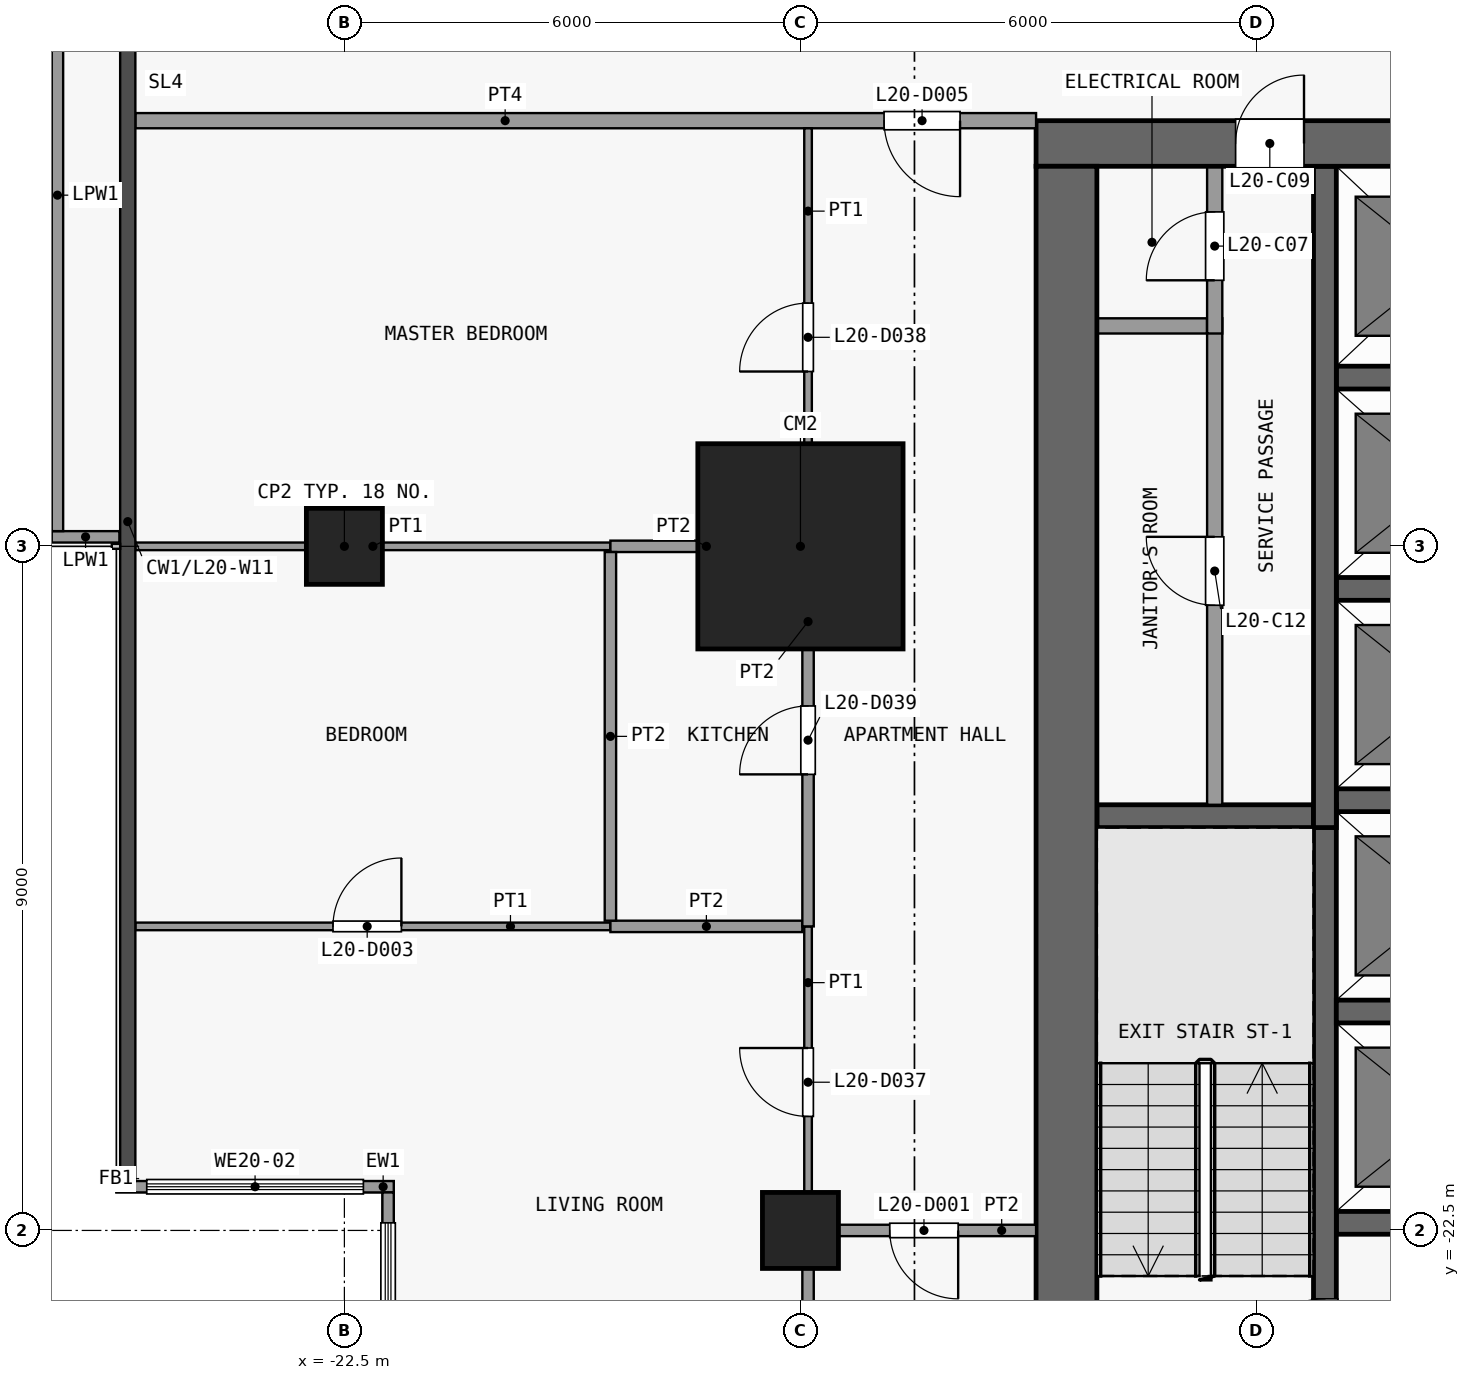
"""IFC4 building model, lengths in metres.
Left out: names, types, materials, properties, quantities, classifications, styles, units other than length and angle.
Written with IfcOpenShell. Run it as: python <this file> out.ifc"""

import sys

from ifc_helpers import new_model, si_unit, direction, frame, frame_2d, origin, origin_2d, place, context, subcontext, project, spatial, rectangle, extrude, element, fill, save


model = new_model("IFC4")
c1 = context("Model", 3, precision=1e-05, world=origin(), true_north=direction((0.0, 1.0)))
c2 = subcontext(c1, "Body", "Model", "MODEL_VIEW")
j1 = project(units=[si_unit("LENGTHUNIT", "METRE"), si_unit("PLANEANGLEUNIT", "RADIAN")], contexts=[c1])
p1 = place(None, origin())
s1 = spatial("IfcSite", under=j1, at=p1, CompositionType="ELEMENT")
p2 = place(p1, origin())
s2 = spatial("IfcBuilding", under=s1, at=p2, CompositionType="ELEMENT")
p3 = place(p2, frame((0.0, 0.0, 84.7)))
s3 = spatial("IfcBuildingStorey", under=s2, at=p3, CompositionType="ELEMENT", Elevation=84.7)
for number, where, z_axis, x_axis in (
    (1, (-22.5, -13.5, 0.0), (0.0, 0.0, 1.0), (1.0, 0.0, 0.0)),
    (2, (-16.5, -22.5, 0.0), (0.0, 0.0, 1.0), (1.0, 0.0, 0.0)),
):
    element("IfcColumn", number, at=place(p3, frame(where, z_axis=z_axis, x_axis=x_axis)), inside=s3, PredefinedType="COLUMN", context=c2, shape_type="SweptSolid", body=[
        extrude(rectangle(XDim=1.0, YDim=1.0, at=origin_2d()), origin(), (0.0, 0.0, 1.0), 3.6),
    ])
p4 = place(p3, frame((-16.5, -13.5, 0.0), z_axis=(0.0, 0.0, 1.0), x_axis=(1.0, 0.0, 0.0)))
e3 = element("IfcColumn", 3, at=p4, inside=s3, PredefinedType="COLUMN", context=c2, shape_type="SweptSolid", body=[
    extrude(rectangle(XDim=2.7, YDim=2.7, at=origin_2d()), origin(), (0.0, 0.0, 1.0), 3.6),
])
p5 = place(p3, frame((-13.4, -8.2, 0.0), z_axis=(0.0, 0.0, 1.0), x_axis=(1.0, 0.0, 0.0)))
e4 = element("IfcWall", 4, at=p5, inside=s3, PredefinedType="SHEAR", context=c2, shape_type="SweptSolid", body=[
    extrude(rectangle(XDim=26.8, YDim=0.6, at=frame_2d((13.4, 0.0))), origin(), (0.0, 0.0, 1.0), 3.3),
])
p6 = place(p5, frame((7.7, 0.0, 0.0)))
e5 = element("IfcOpeningElement", 5, at=p6, cuts=e4, PredefinedType="OPENING", context=c2, shape_type="SweptSolid", body=[
    extrude(rectangle(XDim=1.8, YDim=2.1, at=frame_2d((0.9, 1.05))), frame((0.0, 0.31, 0.0), z_axis=(0.0, -1.0, 0.0), x_axis=(1.0, 0.0, 0.0)), (0.0, 0.0, 1.0), 0.62),
])
p7 = place(p5, frame((17.3, 0.0, 0.0)))
e6 = element("IfcOpeningElement", 6, at=p7, cuts=e4, PredefinedType="OPENING", context=c2, shape_type="SweptSolid", body=[
    extrude(rectangle(XDim=1.8, YDim=2.1, at=frame_2d((0.9, 1.05))), frame((0.0, 0.31, 0.0), z_axis=(0.0, -1.0, 0.0), x_axis=(1.0, 0.0, 0.0)), (0.0, 0.0, 1.0), 0.62),
])
p8 = place(p5, frame((2.625, 0.0, 0.0)))
e7 = element("IfcOpeningElement", 7, at=p8, cuts=e4, PredefinedType="OPENING", context=c2, shape_type="SweptSolid", body=[
    extrude(rectangle(XDim=0.9, YDim=2.1, at=frame_2d((0.45, 1.05))), frame((0.0, 0.31, 0.0), z_axis=(0.0, -1.0, 0.0), x_axis=(1.0, 0.0, 0.0)), (0.0, 0.0, 1.0), 0.62),
])
p9 = place(p5, frame((23.275, 0.0, 0.0)))
e8 = element("IfcOpeningElement", 8, at=p9, cuts=e4, PredefinedType="OPENING", context=c2, shape_type="SweptSolid", body=[
    extrude(rectangle(XDim=0.9, YDim=2.1, at=frame_2d((0.45, 1.05))), frame((0.0, 0.31, 0.0), z_axis=(0.0, -1.0, 0.0), x_axis=(1.0, 0.0, 0.0)), (0.0, 0.0, 1.0), 0.62),
])
p10 = place(p3, frame((-13.0, -24.6, 0.0), z_axis=(0.0, 0.0, 1.0), x_axis=(0.0, 1.0, 0.0)))
e9 = element("IfcWall", 9, at=p10, inside=s3, PredefinedType="SHEAR", context=c2, shape_type="SweptSolid", body=[
    extrude(rectangle(XDim=16.1, YDim=0.8, at=frame_2d((8.05, 0.0))), origin(), (0.0, 0.0, 1.0), 3.3),
])
for number, where, z_axis, x_axis in (
    (10, (-9.45, -22.4, 0.0), (0.0, 0.0, 1.0), (1.0, 0.0, 0.0)),
    (11, (-9.45, -19.62, 0.0), (0.0, 0.0, 1.0), (1.0, 0.0, 0.0)),
):
    element("IfcWall", number, at=place(p3, frame(where, z_axis=z_axis, x_axis=x_axis)), inside=s3, PredefinedType="SHEAR", context=c2, shape_type="SweptSolid", body=[
        extrude(rectangle(XDim=2.8, YDim=0.3, at=frame_2d((1.4, 0.0))), origin(), (0.0, 0.0, 1.0), 3.3),
    ])
p11 = place(p3, frame((-12.6, -17.05, 0.0), z_axis=(0.0, 0.0, 1.0), x_axis=(1.0, 0.0, 0.0)))
e12 = element("IfcWall", 12, at=p11, inside=s3, PredefinedType="SHEAR", context=c2, shape_type="SweptSolid", body=[
    extrude(rectangle(XDim=2.85, YDim=0.3, at=frame_2d((1.425, 0.0))), origin(), (0.0, 0.0, 1.0), 3.3),
])
for number, where, z_axis, x_axis in (
    (13, (-9.45, -16.84, 0.0), (0.0, 0.0, 1.0), (1.0, 0.0, 0.0)),
    (14, (-9.45, -14.06, 0.0), (0.0, 0.0, 1.0), (1.0, 0.0, 0.0)),
    (15, (-9.45, -11.28, 0.0), (0.0, 0.0, 1.0), (1.0, 0.0, 0.0)),
):
    element("IfcWall", number, at=place(p3, frame(where, z_axis=z_axis, x_axis=x_axis)), inside=s3, PredefinedType="SHEAR", context=c2, shape_type="SweptSolid", body=[
        extrude(rectangle(XDim=2.8, YDim=0.3, at=frame_2d((1.4, 0.0))), origin(), (0.0, 0.0, 1.0), 3.3),
    ])
p12 = place(p3, frame((-12.6, -10.6, 0.0), z_axis=(0.0, 0.0, 1.0), x_axis=(1.0, 0.0, 0.0)))
e16 = element("IfcWall", 16, at=p12, inside=s3, PredefinedType="PARTITIONING", context=c2, shape_type="SweptSolid", body=[
    extrude(rectangle(XDim=1.45, YDim=0.2, at=frame_2d((0.725, 0.0))), origin(), (0.0, 0.0, 1.0), 3.3),
])
p13 = place(p3, frame((-11.05, -16.9, 0.0), z_axis=(0.0, 0.0, 1.0), x_axis=(0.0, 1.0, 0.0)))
e17 = element("IfcWall", 17, at=p13, inside=s3, PredefinedType="PARTITIONING", context=c2, shape_type="SweptSolid", body=[
    extrude(rectangle(XDim=6.4, YDim=0.2, at=frame_2d((3.2, 0.0))), origin(), (0.0, 0.0, 1.0), 3.3),
])
p14 = place(p13, frame((2.625, 0.0, 0.0)))
e18 = element("IfcOpeningElement", 18, at=p14, cuts=e17, PredefinedType="OPENING", context=c2, shape_type="SweptSolid", body=[
    extrude(rectangle(XDim=0.9, YDim=2.1, at=frame_2d((0.45, 1.05))), frame((0.0, 0.11, 0.0), z_axis=(0.0, -1.0, 0.0), x_axis=(1.0, 0.0, 0.0)), (0.0, 0.0, 1.0), 0.22),
])
p15 = place(p3, frame((-11.05, -10.7, 0.0), z_axis=(0.0, 0.0, 1.0), x_axis=(0.0, 1.0, 0.0)))
e19 = element("IfcWall", 19, at=p15, inside=s3, PredefinedType="PARTITIONING", context=c2, shape_type="SweptSolid", body=[
    extrude(rectangle(XDim=2.2, YDim=0.2, at=frame_2d((1.1, 0.0))), origin(), (0.0, 0.0, 1.0), 3.3),
])
p16 = place(p15, frame((0.7, 0.0, 0.0)))
e20 = element("IfcOpeningElement", 20, at=p16, cuts=e19, PredefinedType="OPENING", context=c2, shape_type="SweptSolid", body=[
    extrude(rectangle(XDim=0.9, YDim=2.1, at=frame_2d((0.45, 1.05))), frame((0.0, 0.11, 0.0), z_axis=(0.0, -1.0, 0.0), x_axis=(1.0, 0.0, 0.0)), (0.0, 0.0, 1.0), 0.22),
])
p17 = place(p3, frame((-9.6, -24.6, 0.0), z_axis=(0.0, 0.0, 1.0), x_axis=(0.0, 1.0, 0.0)))
e21 = element("IfcWall", 21, at=p17, inside=s3, PredefinedType="SHEAR", context=c2, shape_type="SweptSolid", body=[
    extrude(rectangle(XDim=7.7, YDim=0.3, at=frame_2d((3.85, 0.0))), origin(), (0.0, 0.0, 1.0), 3.3),
])
p18 = place(p17, frame((0.1, 0.0, 0.0)))
e22 = element("IfcOpeningElement", 22, at=p18, cuts=e21, PredefinedType="OPENING", context=c2, shape_type="SweptSolid", body=[
    extrude(rectangle(XDim=1.1, YDim=2.1, at=frame_2d((0.55, 1.05))), frame((0.0, 0.16, 0.0), z_axis=(0.0, -1.0, 0.0), x_axis=(1.0, 0.0, 0.0)), (0.0, 0.0, 1.0), 0.32),
])
p19 = place(p3, frame((-9.6, -17.2, 0.0), z_axis=(0.0, 0.0, 1.0), x_axis=(0.0, 1.0, 0.0)))
e23 = element("IfcWall", 23, at=p19, inside=s3, PredefinedType="SHEAR", context=c2, shape_type="SweptSolid", body=[
    extrude(rectangle(XDim=8.7, YDim=0.3, at=frame_2d((4.35, 0.0))), origin(), (0.0, 0.0, 1.0), 3.3),
])
p20 = place(p3, frame((-21.925, -25.25, 0.0), z_axis=(0.0, 0.0, 1.0), x_axis=(0.0, 1.0, 0.0)))
e24 = element("IfcWall", 24, at=p20, inside=s3, PredefinedType="SOLIDWALL", context=c2, shape_type="SweptSolid", body=[
    extrude(rectangle(XDim=3.25, YDim=0.15, at=frame_2d((1.625, 0.0))), origin(), (0.0, 0.0, 1.0), 3.3),
])
p21 = place(p20, frame((0.4, 0.0, 0.9)))
e25 = element("IfcOpeningElement", 25, at=p21, cuts=e24, PredefinedType="OPENING", context=c2, shape_type="SweptSolid", body=[
    extrude(rectangle(XDim=2.45, YDim=2.4, at=frame_2d((1.225, 1.2))), frame((0.0, 0.085, 0.0), z_axis=(0.0, -1.0, 0.0), x_axis=(1.0, 0.0, 0.0)), (0.0, 0.0, 1.0), 0.17),
])
p22 = place(p3, frame((-21.85, -21.925, 0.0), z_axis=(0.0, 0.0, 1.0), x_axis=(-1.0, 0.0, 0.0)))
e26 = element("IfcWall", 26, at=p22, inside=s3, PredefinedType="SOLIDWALL", context=c2, shape_type="SweptSolid", body=[
    extrude(rectangle(XDim=3.65, YDim=0.15, at=frame_2d((1.825, 0.0))), origin(), (0.0, 0.0, 1.0), 3.3),
])
p23 = place(p22, frame((0.4, 0.0, 0.9)))
e27 = element("IfcOpeningElement", 27, at=p23, cuts=e26, PredefinedType="OPENING", context=c2, shape_type="SweptSolid", body=[
    extrude(rectangle(XDim=2.85, YDim=2.4, at=frame_2d((1.425, 1.2))), frame((0.0, 0.085, 0.0), z_axis=(0.0, -1.0, 0.0), x_axis=(1.0, 0.0, 0.0)), (0.0, 0.0, 1.0), 0.17),
])
p24 = place(p3, frame((-25.46, -13.375, 0.0), z_axis=(0.0, 0.0, 1.0), x_axis=(-1.0, 0.0, 0.0)))
e28 = element("IfcWall", 28, at=p24, inside=s3, PredefinedType="PARAPET", context=c2, shape_type="SweptSolid", body=[
    extrude(rectangle(XDim=0.89, YDim=0.15, at=frame_2d((0.445, 0.0))), origin(), (0.0, 0.0, 1.0), 1.15),
])
p25 = place(p3, frame((-26.275, -13.3, 0.0), z_axis=(0.0, 0.0, 1.0), x_axis=(0.0, 1.0, 0.0)))
e29 = element("IfcWall", 29, at=p25, inside=s3, PredefinedType="PARAPET", context=c2, shape_type="SweptSolid", body=[
    extrude(rectangle(XDim=8.84, YDim=0.15, at=frame_2d((4.42, 0.0))), origin(), (0.0, 0.0, 1.0), 1.15),
])
p26 = place(p3, frame((-16.325, -22.5, 0.0), z_axis=(0.0, 0.0, 1.0), x_axis=(1.0, 0.0, 0.0)))
e30 = element("IfcWall", 30, at=p26, inside=s3, PredefinedType="PARTITIONING", context=c2, shape_type="SweptSolid", body=[
    extrude(rectangle(XDim=2.925, YDim=0.15, at=frame_2d((1.462, 0.0))), origin(), (0.0, 0.0, 1.0), 3.3),
])
p27 = place(p26, frame((1.0, 0.0, 0.0)))
e31 = element("IfcOpeningElement", 31, at=p27, cuts=e30, PredefinedType="OPENING", context=c2, shape_type="SweptSolid", body=[
    extrude(rectangle(XDim=0.9, YDim=2.1, at=frame_2d((0.45, 1.05))), frame((0.0, 0.085, 0.0), z_axis=(0.0, -1.0, 0.0), x_axis=(1.0, 0.0, 0.0)), (0.0, 0.0, 1.0), 0.17),
])
p28 = place(p3, frame((-25.25, -18.5, 0.0), z_axis=(0.0, 0.0, 1.0), x_axis=(1.0, 0.0, 0.0)))
e32 = element("IfcWall", 32, at=p28, inside=s3, PredefinedType="PARTITIONING", context=c2, shape_type="SweptSolid", body=[
    extrude(rectangle(XDim=6.25, YDim=0.1, at=frame_2d((3.125, 0.0))), origin(), (0.0, 0.0, 1.0), 3.3),
])
p29 = place(p28, frame((2.6, 0.0, 0.0)))
e33 = element("IfcOpeningElement", 33, at=p29, cuts=e32, PredefinedType="OPENING", context=c2, shape_type="SweptSolid", body=[
    extrude(rectangle(XDim=0.9, YDim=2.1, at=frame_2d((0.45, 1.05))), frame((0.0, 0.06, 0.0), z_axis=(0.0, -1.0, 0.0), x_axis=(1.0, 0.0, 0.0)), (0.0, 0.0, 1.0), 0.12),
])
p30 = place(p3, frame((-19.0, -18.5, 0.0), z_axis=(0.0, 0.0, 1.0), x_axis=(1.0, 0.0, 0.0)))
e34 = element("IfcWall", 34, at=p30, inside=s3, PredefinedType="PARTITIONING", context=c2, shape_type="SweptSolid", body=[
    extrude(rectangle(XDim=2.525, YDim=0.15, at=frame_2d((1.262, 0.0))), origin(), (0.0, 0.0, 1.0), 3.3),
])
p31 = place(p3, frame((-25.25, -13.5, 0.0), z_axis=(0.0, 0.0, 1.0), x_axis=(1.0, 0.0, 0.0)))
e35 = element("IfcWall", 35, at=p31, inside=s3, PredefinedType="PARTITIONING", context=c2, shape_type="SweptSolid", body=[
    extrude(rectangle(XDim=6.25, YDim=0.1, at=frame_2d((3.125, 0.0))), origin(), (0.0, 0.0, 1.0), 3.3),
])
p32 = place(p3, frame((-19.0, -13.5, 0.0), z_axis=(0.0, 0.0, 1.0), x_axis=(1.0, 0.0, 0.0)))
e36 = element("IfcWall", 36, at=p32, inside=s3, PredefinedType="PARTITIONING", context=c2, shape_type="SweptSolid", body=[
    extrude(rectangle(XDim=2.525, YDim=0.15, at=frame_2d((1.262, 0.0))), origin(), (0.0, 0.0, 1.0), 3.3),
])
p33 = place(p3, frame((-25.25, -7.9, 0.0), z_axis=(0.0, 0.0, 1.0), x_axis=(1.0, 0.0, 0.0)))
e37 = element("IfcWall", 37, at=p33, inside=s3, PredefinedType="PARTITIONING", context=c2, shape_type="SweptSolid", body=[
    extrude(rectangle(XDim=11.85, YDim=0.2, at=frame_2d((5.925, 0.0))), origin(), (0.0, 0.0, 1.0), 3.3),
])
p34 = place(p33, frame((9.85, 0.0, 0.0)))
e38 = element("IfcOpeningElement", 38, at=p34, cuts=e37, PredefinedType="OPENING", context=c2, shape_type="SweptSolid", body=[
    extrude(rectangle(XDim=1.0, YDim=2.1, at=frame_2d((0.5, 1.05))), frame((0.0, 0.11, 0.0), z_axis=(0.0, -1.0, 0.0), x_axis=(1.0, 0.0, 0.0)), (0.0, 0.0, 1.0), 0.22),
])
p35 = place(p3, frame((-19.0, -18.425, 0.0), z_axis=(0.0, 0.0, 1.0), x_axis=(0.0, 1.0, 0.0)))
e39 = element("IfcWall", 39, at=p35, inside=s3, PredefinedType="PARTITIONING", context=c2, shape_type="SweptSolid", body=[
    extrude(rectangle(XDim=4.85, YDim=0.15, at=frame_2d((2.425, 0.0))), origin(), (0.0, 0.0, 1.0), 3.3),
])
p36 = place(p3, frame((-16.4, -22.5, 0.0), z_axis=(0.0, 0.0, 1.0), x_axis=(0.0, 1.0, 0.0)))
e40 = element("IfcWall", 40, at=p36, inside=s3, PredefinedType="PARTITIONING", context=c2, shape_type="SweptSolid", body=[
    extrude(rectangle(XDim=4.0, YDim=0.1, at=frame_2d((2.0, 0.0))), origin(), (0.0, 0.0, 1.0), 3.3),
])
p37 = place(p36, frame((1.5, 0.0, 0.0)))
e41 = element("IfcOpeningElement", 41, at=p37, cuts=e40, PredefinedType="OPENING", context=c2, shape_type="SweptSolid", body=[
    extrude(rectangle(XDim=0.9, YDim=2.1, at=frame_2d((0.45, 1.05))), frame((0.0, 0.06, 0.0), z_axis=(0.0, -1.0, 0.0), x_axis=(1.0, 0.0, 0.0)), (0.0, 0.0, 1.0), 0.12),
])
p38 = place(p3, frame((-16.4, -13.5, 0.0), z_axis=(0.0, 0.0, 1.0), x_axis=(0.0, 1.0, 0.0)))
e42 = element("IfcWall", 42, at=p38, inside=s3, PredefinedType="PARTITIONING", context=c2, shape_type="SweptSolid", body=[
    extrude(rectangle(XDim=5.5, YDim=0.1, at=frame_2d((2.75, 0.0))), origin(), (0.0, 0.0, 1.0), 3.3),
])
p39 = place(p38, frame((2.3, 0.0, 0.0)))
e43 = element("IfcOpeningElement", 43, at=p39, cuts=e42, PredefinedType="OPENING", context=c2, shape_type="SweptSolid", body=[
    extrude(rectangle(XDim=0.9, YDim=2.1, at=frame_2d((0.45, 1.05))), frame((0.0, 0.06, 0.0), z_axis=(0.0, -1.0, 0.0), x_axis=(1.0, 0.0, 0.0)), (0.0, 0.0, 1.0), 0.12),
])
p40 = place(p3, frame((-16.4, -25.25, 0.0), z_axis=(0.0, 0.0, 1.0), x_axis=(0.0, 1.0, 0.0)))
e44 = element("IfcWall", 44, at=p40, inside=s3, PredefinedType="PARTITIONING", context=c2, shape_type="SweptSolid", body=[
    extrude(rectangle(XDim=2.75, YDim=0.15, at=frame_2d((1.375, 0.0))), origin(), (0.0, 0.0, 1.0), 3.3),
])
p41 = place(p3, frame((-16.4, -18.5, 0.0), z_axis=(0.0, 0.0, 1.0), x_axis=(0.0, 1.0, 0.0)))
e45 = element("IfcWall", 45, at=p41, inside=s3, PredefinedType="PARTITIONING", context=c2, shape_type="SweptSolid", body=[
    extrude(rectangle(XDim=5.0, YDim=0.15, at=frame_2d((2.5, 0.0))), origin(), (0.0, 0.0, 1.0), 3.3),
])
p42 = place(p41, frame((2.0, 0.0, 0.0)))
e46 = element("IfcOpeningElement", 46, at=p42, cuts=e45, PredefinedType="OPENING", context=c2, shape_type="SweptSolid", body=[
    extrude(rectangle(XDim=0.9, YDim=2.1, at=frame_2d((0.45, 1.05))), frame((0.0, 0.085, 0.0), z_axis=(0.0, -1.0, 0.0), x_axis=(1.0, 0.0, 0.0)), (0.0, 0.0, 1.0), 0.17),
])
p43 = place(p16, origin())
e47 = element("IfcDoor", 47, at=p43, inside=s3, OperationType="SINGLE_SWING_LEFT", PredefinedType="DOOR", context=c2, shape_type="SweptSolid", body=[
    extrude(rectangle(XDim=0.9, YDim=2.1, at=frame_2d((0.45, 1.05))), frame((0.0, 0.025, 0.0), z_axis=(0.0, -1.0, 0.0), x_axis=(1.0, 0.0, 0.0)), (0.0, 0.0, 1.0), 0.05),
])
fill(e20, e47)
p44 = place(p8, origin())
e48 = element("IfcDoor", 48, at=p44, inside=s3, OperationType="SINGLE_SWING_RIGHT", PredefinedType="DOOR", context=c2, shape_type="SweptSolid", body=[
    extrude(rectangle(XDim=0.9, YDim=2.1, at=frame_2d((0.45, 1.05))), frame((0.0, 0.025, 0.0), z_axis=(0.0, -1.0, 0.0), x_axis=(1.0, 0.0, 0.0)), (0.0, 0.0, 1.0), 0.05),
])
fill(e7, e48)
p45 = place(p14, origin())
e49 = element("IfcDoor", 49, at=p45, inside=s3, OperationType="SINGLE_SWING_RIGHT", PredefinedType="DOOR", context=c2, shape_type="SweptSolid", body=[
    extrude(rectangle(XDim=0.9, YDim=2.1, at=frame_2d((0.45, 1.05))), frame((0.0, 0.025, 0.0), z_axis=(0.0, -1.0, 0.0), x_axis=(1.0, 0.0, 0.0)), (0.0, 0.0, 1.0), 0.05),
])
fill(e18, e49)
p46 = place(p18, origin())
e50 = element("IfcDoor", 50, at=p46, inside=s3, OperationType="SINGLE_SWING_LEFT", PredefinedType="DOOR", context=c2, shape_type="SweptSolid", body=[
    extrude(rectangle(XDim=1.1, YDim=2.1, at=frame_2d((0.55, 1.05))), frame((0.0, 0.025, 0.0), z_axis=(0.0, -1.0, 0.0), x_axis=(1.0, 0.0, 0.0)), (0.0, 0.0, 1.0), 0.05),
])
fill(e22, e50)
p47 = place(p21, origin())
e51 = element("IfcWindow", 51, at=p47, inside=s3, PartitioningType="SINGLE_PANEL", PredefinedType="WINDOW", context=c2, shape_type="SweptSolid", body=[
    extrude(rectangle(XDim=2.45, YDim=2.4, at=frame_2d((1.225, 1.2))), frame((0.0, 0.03, 0.0), z_axis=(0.0, -1.0, 0.0), x_axis=(1.0, 0.0, 0.0)), (0.0, 0.0, 1.0), 0.06),
])
fill(e25, e51)
p48 = place(p23, origin())
e52 = element("IfcWindow", 52, at=p48, inside=s3, PartitioningType="SINGLE_PANEL", PredefinedType="WINDOW", context=c2, shape_type="SweptSolid", body=[
    extrude(rectangle(XDim=2.85, YDim=2.4, at=frame_2d((1.425, 1.2))), frame((0.0, 0.03, 0.0), z_axis=(0.0, -1.0, 0.0), x_axis=(1.0, 0.0, 0.0)), (0.0, 0.0, 1.0), 0.06),
])
fill(e27, e52)
p49 = place(p27, origin())
e53 = element("IfcDoor", 53, at=p49, inside=s3, OperationType="SINGLE_SWING_RIGHT", PredefinedType="DOOR", context=c2, shape_type="SweptSolid", body=[
    extrude(rectangle(XDim=0.9, YDim=2.1, at=frame_2d((0.45, 1.05))), frame((0.0, 0.025, 0.0), z_axis=(0.0, -1.0, 0.0), x_axis=(1.0, 0.0, 0.0)), (0.0, 0.0, 1.0), 0.05),
])
fill(e31, e53)
p50 = place(p29, origin())
e54 = element("IfcDoor", 54, at=p50, inside=s3, OperationType="SINGLE_SWING_LEFT", PredefinedType="DOOR", context=c2, shape_type="SweptSolid", body=[
    extrude(rectangle(XDim=0.9, YDim=2.1, at=frame_2d((0.45, 1.05))), frame((0.0, 0.025, 0.0), z_axis=(0.0, -1.0, 0.0), x_axis=(1.0, 0.0, 0.0)), (0.0, 0.0, 1.0), 0.05),
])
fill(e33, e54)
p51 = place(p34, origin())
e55 = element("IfcDoor", 55, at=p51, inside=s3, OperationType="SINGLE_SWING_RIGHT", PredefinedType="DOOR", context=c2, shape_type="SweptSolid", body=[
    extrude(rectangle(XDim=1.0, YDim=2.1, at=frame_2d((0.5, 1.05))), frame((0.0, 0.025, 0.0), z_axis=(0.0, -1.0, 0.0), x_axis=(1.0, 0.0, 0.0)), (0.0, 0.0, 1.0), 0.05),
])
fill(e38, e55)
p52 = place(p37, origin())
e56 = element("IfcDoor", 56, at=p52, inside=s3, OperationType="SINGLE_SWING_LEFT", PredefinedType="DOOR", context=c2, shape_type="SweptSolid", body=[
    extrude(rectangle(XDim=0.9, YDim=2.1, at=frame_2d((0.45, 1.05))), frame((0.0, 0.025, 0.0), z_axis=(0.0, -1.0, 0.0), x_axis=(1.0, 0.0, 0.0)), (0.0, 0.0, 1.0), 0.05),
])
fill(e41, e56)
p53 = place(p39, origin())
e57 = element("IfcDoor", 57, at=p53, inside=s3, OperationType="SINGLE_SWING_RIGHT", PredefinedType="DOOR", context=c2, shape_type="SweptSolid", body=[
    extrude(rectangle(XDim=0.9, YDim=2.1, at=frame_2d((0.45, 1.05))), frame((0.0, 0.025, 0.0), z_axis=(0.0, -1.0, 0.0), x_axis=(1.0, 0.0, 0.0)), (0.0, 0.0, 1.0), 0.05),
])
fill(e43, e57)
p54 = place(p42, origin())
e58 = element("IfcDoor", 58, at=p54, inside=s3, OperationType="SINGLE_SWING_RIGHT", PredefinedType="DOOR", context=c2, shape_type="SweptSolid", body=[
    extrude(rectangle(XDim=0.9, YDim=2.1, at=frame_2d((0.45, 1.05))), frame((0.0, 0.025, 0.0), z_axis=(0.0, -1.0, 0.0), x_axis=(1.0, 0.0, 0.0)), (0.0, 0.0, 1.0), 0.05),
])
fill(e46, e58)
save(model, sys.argv[1])
